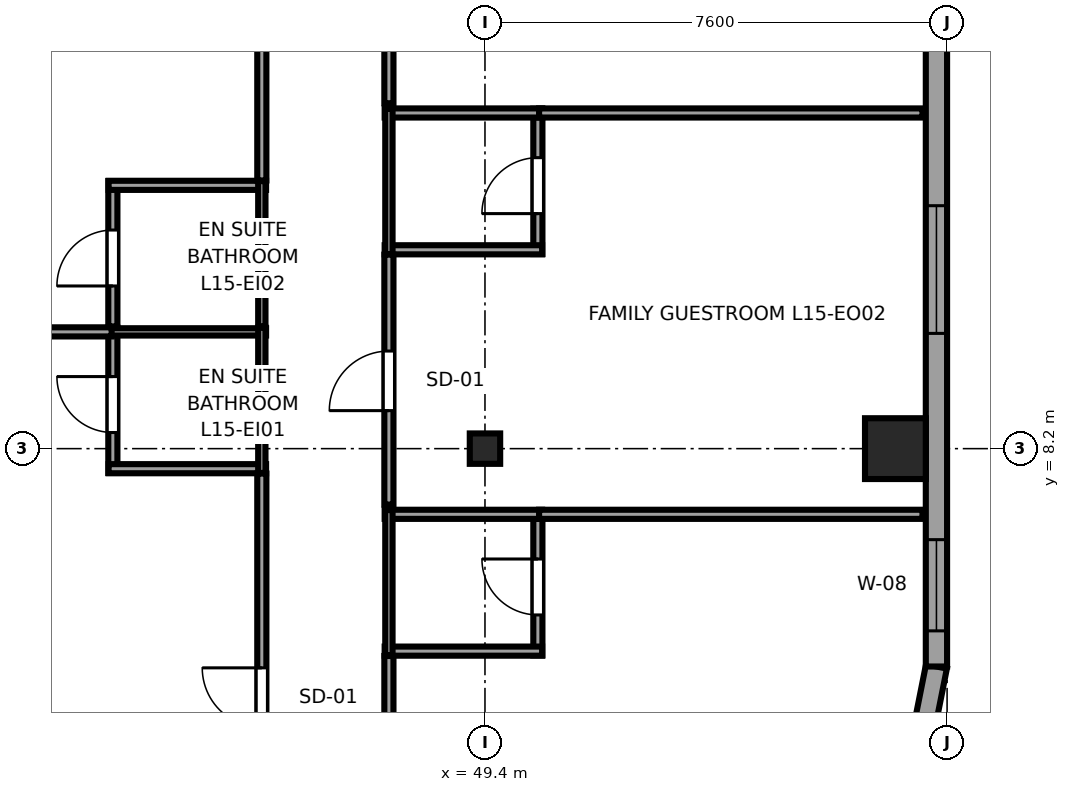
"""IFC4 building model, lengths in metres.
Left out: names, types, materials, properties, quantities, classifications, styles, units other than length and angle.
Written with IfcOpenShell. Run it as: python <this file> out.ifc"""

import sys

from ifc_helpers import new_model, si_unit, direction, frame, frame_2d, origin, origin_2d, place, context, subcontext, project, spatial, rectangle, i_section, extrude, source, transform, mapped, element, fill, save


model = new_model("IFC4")
c1 = context("Model", 3, precision=1e-05, world=origin(), true_north=direction((0.0, 1.0)))
c2 = subcontext(c1, "Body", "Model", "MODEL_VIEW")
j1 = project(units=[si_unit("LENGTHUNIT", "METRE"), si_unit("PLANEANGLEUNIT", "RADIAN")], contexts=[c1])
p1 = place(None, origin())
s1 = spatial("IfcSite", under=j1, at=p1, CompositionType="ELEMENT")
p2 = place(p1, origin())
s2 = spatial("IfcBuilding", under=s1, at=p2, CompositionType="ELEMENT")
p3 = place(p2, frame((0.0, 0.0, 63.95)))
s3 = spatial("IfcBuildingStorey", under=s2, at=p3, CompositionType="ELEMENT", Elevation=63.95)
m1 = source(origin(), c2, "Body", "SweptSolid", [
    extrude(i_section(OverallWidth=0.5, OverallDepth=0.5, WebThickness=0.028, FlangeThickness=0.045, at=origin_2d()), origin(), (0.0, 0.0, 1.0), 3.55),
])
p4 = place(p3, frame((49.4, 8.2, 0.0), z_axis=(0.0, 0.0, 1.0), x_axis=(1.0, 0.0, 0.0)))
e1 = element("IfcColumn", 1, at=p4, inside=s3, PredefinedType="COLUMN", context=c2, shape_type="MappedRepresentation", body=[
    mapped(m1, transform((0.0, 0.0, 0.0), x_axis=(1.0, 0.0, 0.0), y_axis=(0.0, 1.0, 0.0), z_axis=(0.0, 0.0, 1.0), scale=1.0)),
])
m2 = source(origin(), c2, "Body", "SweptSolid", [
    extrude(rectangle(XDim=1.0, YDim=1.0, at=origin_2d()), origin(), (0.0, 0.0, 1.0), 3.55),
])
p5 = place(p3, frame((56.15, 8.2, 0.0), z_axis=(0.0, 0.0, 1.0), x_axis=(1.0, 0.0, 0.0)))
e2 = element("IfcColumn", 2, at=p5, inside=s3, PredefinedType="COLUMN", context=c2, shape_type="MappedRepresentation", body=[
    mapped(m2, transform((0.0, 0.0, 0.0), x_axis=(1.0, 0.0, 0.0), y_axis=(0.0, 1.0, 0.0), z_axis=(0.0, 0.0, 1.0), scale=1.0)),
])
p6 = place(p3, frame((56.485, 2.908, 0.0), z_axis=(0.0, 0.0, 1.0), x_axis=(0.195011420161, 0.980800971659, 0.0)))
e3 = element("IfcWall", 3, at=p6, inside=s3, PredefinedType="SOLIDWALL", context=c2, shape_type="SweptSolid", body=[
    extrude(rectangle(XDim=1.743, YDim=0.35, at=frame_2d((0.871, 0.0))), origin(), (0.0, 0.0, 1.0), 3.37),
])
p7 = place(p3, frame((56.825, 4.617, 0.0), z_axis=(0.0, 0.0, 1.0), x_axis=(0.0, 1.0, 0.0)))
e4 = element("IfcWall", 4, at=p7, inside=s3, PredefinedType="SOLIDWALL", context=c2, shape_type="SweptSolid", body=[
    extrude(rectangle(XDim=36.766, YDim=0.35, at=frame_2d((18.383, 0.0))), origin(), (0.0, 0.0, 1.0), 3.37),
])
p8 = place(p7, frame((5.478, 0.0, 0.68)))
e5 = element("IfcOpeningElement", 5, at=p8, cuts=e4, PredefinedType="OPENING", context=c2, shape_type="SweptSolid", body=[
    extrude(rectangle(XDim=2.1, YDim=1.9, at=frame_2d((1.05, 0.95))), frame((0.0, 0.185, 0.0), z_axis=(0.0, -1.0, 0.0), x_axis=(1.0, 0.0, 0.0)), (0.0, 0.0, 1.0), 0.37),
])
p9 = place(p7, frame((12.831, 0.0, 0.68)))
e6 = element("IfcOpeningElement", 6, at=p9, cuts=e4, PredefinedType="OPENING", context=c2, shape_type="SweptSolid", body=[
    extrude(rectangle(XDim=2.1, YDim=1.9, at=frame_2d((1.05, 0.95))), frame((0.0, 0.185, 0.0), z_axis=(0.0, -1.0, 0.0), x_axis=(1.0, 0.0, 0.0)), (0.0, 0.0, 1.0), 0.37),
])
p10 = place(p7, frame((16.783, 0.0, 0.68)))
e7 = element("IfcOpeningElement", 7, at=p10, cuts=e4, PredefinedType="OPENING", context=c2, shape_type="SweptSolid", body=[
    extrude(rectangle(XDim=2.1, YDim=1.9, at=frame_2d((1.05, 0.95))), frame((0.0, 0.185, 0.0), z_axis=(0.0, -1.0, 0.0), x_axis=(1.0, 0.0, 0.0)), (0.0, 0.0, 1.0), 0.37),
])
p11 = place(p7, frame((25.236, 0.0, 0.68)))
e8 = element("IfcOpeningElement", 8, at=p11, cuts=e4, PredefinedType="OPENING", context=c2, shape_type="SweptSolid", body=[
    extrude(rectangle(XDim=2.1, YDim=1.9, at=frame_2d((1.05, 0.95))), frame((0.0, 0.185, 0.0), z_axis=(0.0, -1.0, 0.0), x_axis=(1.0, 0.0, 0.0)), (0.0, 0.0, 1.0), 0.37),
])
p12 = place(p7, frame((30.238, 0.0, 0.68)))
e9 = element("IfcOpeningElement", 9, at=p12, cuts=e4, PredefinedType="OPENING", context=c2, shape_type="SweptSolid", body=[
    extrude(rectangle(XDim=2.1, YDim=1.9, at=frame_2d((1.05, 0.95))), frame((0.0, 0.185, 0.0), z_axis=(0.0, -1.0, 0.0), x_axis=(1.0, 0.0, 0.0)), (0.0, 0.0, 1.0), 0.37),
])
p13 = place(p7, frame((33.14, 0.0, 0.68)))
e10 = element("IfcOpeningElement", 10, at=p13, cuts=e4, PredefinedType="OPENING", context=c2, shape_type="SweptSolid", body=[
    extrude(rectangle(XDim=2.1, YDim=1.9, at=frame_2d((1.05, 0.95))), frame((0.0, 0.185, 0.0), z_axis=(0.0, -1.0, 0.0), x_axis=(1.0, 0.0, 0.0)), (0.0, 0.0, 1.0), 0.37),
])
p14 = place(p7, frame((0.586, 0.0, 0.62)))
e11 = element("IfcOpeningElement", 11, at=p14, cuts=e4, PredefinedType="OPENING", context=c2, shape_type="SweptSolid", body=[
    extrude(rectangle(XDim=1.5, YDim=1.55, at=frame_2d((0.75, 0.775))), frame((0.0, 0.185, 0.0), z_axis=(0.0, -1.0, 0.0), x_axis=(1.0, 0.0, 0.0)), (0.0, 0.0, 1.0), 0.37),
])
p15 = place(p3, frame((43.28, 7.8, 0.0), z_axis=(0.0, 0.0, 1.0), x_axis=(0.0, 1.0, 0.0)))
e12 = element("IfcWall", 12, at=p15, inside=s3, PredefinedType="PARTITIONING", context=c2, shape_type="SweptSolid", body=[
    extrude(rectangle(XDim=2.39, YDim=0.15, at=frame_2d((1.195, 0.0))), origin(), (0.0, 0.0, 1.0), 3.37),
])
p16 = place(p15, frame((0.665, 0.0, 0.0)))
e13 = element("IfcOpeningElement", 13, at=p16, cuts=e12, PredefinedType="OPENING", context=c2, shape_type="SweptSolid", body=[
    extrude(rectangle(XDim=0.92, YDim=2.01, at=frame_2d((0.46, 1.005))), frame((0.0, 0.085, 0.0), z_axis=(0.0, -1.0, 0.0), x_axis=(1.0, 0.0, 0.0)), (0.0, 0.0, 1.0), 0.17),
])
p17 = place(p3, frame((43.21, 7.87, 0.0), z_axis=(0.0, 0.0, 1.0), x_axis=(1.0, 0.0, 0.0)))
e14 = element("IfcWall", 14, at=p17, inside=s3, PredefinedType="PARTITIONING", context=c2, shape_type="SweptSolid", body=[
    extrude(rectangle(XDim=2.59, YDim=0.15, at=frame_2d((1.295, 0.0))), origin(), (0.0, 0.0, 1.0), 3.37),
])
p18 = place(p3, frame((43.21, 10.12, 0.0), z_axis=(0.0, 0.0, 1.0), x_axis=(1.0, 0.0, 0.0)))
e15 = element("IfcWall", 15, at=p18, inside=s3, PredefinedType="PLUMBINGWALL", context=c2, shape_type="SweptSolid", body=[
    extrude(rectangle(XDim=2.59, YDim=0.12, at=frame_2d((1.295, 0.0))), origin(), (0.0, 0.0, 1.0), 3.37),
])
p19 = place(p3, frame((45.73, 7.8, 0.0), z_axis=(0.0, 0.0, 1.0), x_axis=(0.0, 1.0, 0.0)))
e16 = element("IfcWall", 16, at=p19, inside=s3, PredefinedType="PLUMBINGWALL", context=c2, shape_type="SweptSolid", body=[
    extrude(rectangle(XDim=2.39, YDim=0.12, at=frame_2d((1.195, 0.0))), origin(), (0.0, 0.0, 1.0), 2.954),
])
p20 = place(p3, frame((43.28, 10.21, 0.0), z_axis=(0.0, 0.0, 1.0), x_axis=(0.0, 1.0, 0.0)))
e17 = element("IfcWall", 17, at=p20, inside=s3, PredefinedType="PARTITIONING", context=c2, shape_type="SweptSolid", body=[
    extrude(rectangle(XDim=2.39, YDim=0.15, at=frame_2d((1.195, 0.0))), origin(), (0.0, 0.0, 1.0), 3.37),
])
p21 = place(p20, frame((0.665, 0.0, 0.0)))
e18 = element("IfcOpeningElement", 18, at=p21, cuts=e17, PredefinedType="OPENING", context=c2, shape_type="SweptSolid", body=[
    extrude(rectangle(XDim=0.92, YDim=2.01, at=frame_2d((0.46, 1.005))), frame((0.0, 0.085, 0.0), z_axis=(0.0, -1.0, 0.0), x_axis=(1.0, 0.0, 0.0)), (0.0, 0.0, 1.0), 0.17),
])
p22 = place(p3, frame((43.21, 12.53, 0.0), z_axis=(0.0, 0.0, 1.0), x_axis=(1.0, 0.0, 0.0)))
e19 = element("IfcWall", 19, at=p22, inside=s3, PredefinedType="PARTITIONING", context=c2, shape_type="SweptSolid", body=[
    extrude(rectangle(XDim=2.59, YDim=0.15, at=frame_2d((1.295, 0.0))), origin(), (0.0, 0.0, 1.0), 3.37),
])
p23 = place(p3, frame((45.73, 10.21, 0.0), z_axis=(0.0, 0.0, 1.0), x_axis=(0.0, 1.0, 0.0)))
e20 = element("IfcWall", 20, at=p23, inside=s3, PredefinedType="PLUMBINGWALL", context=c2, shape_type="SweptSolid", body=[
    extrude(rectangle(XDim=2.39, YDim=0.12, at=frame_2d((1.195, 0.0))), origin(), (0.0, 0.0, 1.0), 2.954),
])
p24 = place(p3, frame((50.27, 4.8, 0.0), z_axis=(0.0, 0.0, 1.0), x_axis=(0.0, 1.0, 0.0)))
e21 = element("IfcWall", 21, at=p24, inside=s3, PredefinedType="PARTITIONING", context=c2, shape_type="SweptSolid", body=[
    extrude(rectangle(XDim=2.39, YDim=0.15, at=frame_2d((1.195, 0.0))), origin(), (0.0, 0.0, 1.0), 3.37),
])
p25 = place(p24, frame((0.665, 0.0, 0.0)))
e22 = element("IfcOpeningElement", 22, at=p25, cuts=e21, PredefinedType="OPENING", context=c2, shape_type="SweptSolid", body=[
    extrude(rectangle(XDim=0.92, YDim=2.01, at=frame_2d((0.46, 1.005))), frame((0.0, 0.085, 0.0), z_axis=(0.0, -1.0, 0.0), x_axis=(1.0, 0.0, 0.0)), (0.0, 0.0, 1.0), 0.17),
])
for number, where, z_axis, x_axis in (
    (23, (47.75, 4.87, 0.0), (0.0, 0.0, 1.0), (1.0, 0.0, 0.0)),
    (24, (47.75, 7.12, 0.0), (0.0, 0.0, 1.0), (1.0, 0.0, 0.0)),
):
    element("IfcWall", number, at=place(p3, frame(where, z_axis=z_axis, x_axis=x_axis)), inside=s3, PredefinedType="PARTITIONING", context=c2, shape_type="SweptSolid", body=[
        extrude(rectangle(XDim=2.59, YDim=0.15, at=frame_2d((1.295, 0.0))), origin(), (0.0, 0.0, 1.0), 3.37),
    ])
p26 = place(p3, frame((47.82, 4.8, 0.0), z_axis=(0.0, 0.0, 1.0), x_axis=(0.0, 1.0, 0.0)))
e25 = element("IfcWall", 25, at=p26, inside=s3, PredefinedType="PLUMBINGWALL", context=c2, shape_type="SweptSolid", body=[
    extrude(rectangle(XDim=2.39, YDim=0.12, at=frame_2d((1.195, 0.0))), origin(), (0.0, 0.0, 1.0), 3.37),
])
p27 = place(p3, frame((50.27, 11.4, 0.0), z_axis=(0.0, 0.0, 1.0), x_axis=(0.0, 1.0, 0.0)))
e26 = element("IfcWall", 26, at=p27, inside=s3, PredefinedType="PARTITIONING", context=c2, shape_type="SweptSolid", body=[
    extrude(rectangle(XDim=2.39, YDim=0.15, at=frame_2d((1.195, 0.0))), origin(), (0.0, 0.0, 1.0), 3.37),
])
p28 = place(p27, frame((0.665, 0.0, 0.0)))
e27 = element("IfcOpeningElement", 27, at=p28, cuts=e26, PredefinedType="OPENING", context=c2, shape_type="SweptSolid", body=[
    extrude(rectangle(XDim=0.92, YDim=2.01, at=frame_2d((0.46, 1.005))), frame((0.0, 0.085, 0.0), z_axis=(0.0, -1.0, 0.0), x_axis=(1.0, 0.0, 0.0)), (0.0, 0.0, 1.0), 0.17),
])
for number, where, z_axis, x_axis in (
    (28, (47.75, 11.47, 0.0), (0.0, 0.0, 1.0), (1.0, 0.0, 0.0)),
    (29, (47.75, 13.72, 0.0), (0.0, 0.0, 1.0), (1.0, 0.0, 0.0)),
):
    element("IfcWall", number, at=place(p3, frame(where, z_axis=z_axis, x_axis=x_axis)), inside=s3, PredefinedType="PARTITIONING", context=c2, shape_type="SweptSolid", body=[
        extrude(rectangle(XDim=2.59, YDim=0.15, at=frame_2d((1.295, 0.0))), origin(), (0.0, 0.0, 1.0), 3.37),
    ])
p29 = place(p3, frame((47.82, 11.4, 0.0), z_axis=(0.0, 0.0, 1.0), x_axis=(0.0, 1.0, 0.0)))
e30 = element("IfcWall", 30, at=p29, inside=s3, PredefinedType="PLUMBINGWALL", context=c2, shape_type="SweptSolid", body=[
    extrude(rectangle(XDim=2.39, YDim=0.12, at=frame_2d((1.195, 0.0))), origin(), (0.0, 0.0, 1.0), 3.37),
])
p30 = place(p3, frame((45.73, 0.405, 0.0), z_axis=(0.0, 0.0, 1.0), x_axis=(0.0, 1.0, 0.0)))
e31 = element("IfcWall", 31, at=p30, inside=s3, PredefinedType="PARTITIONING", context=c2, shape_type="SweptSolid", body=[
    extrude(rectangle(XDim=7.385, YDim=0.15, at=frame_2d((3.692, 0.0))), origin(), (0.0, 0.0, 1.0), 3.37),
])
p31 = place(p30, frame((3.21, 0.0, 0.0)))
e32 = element("IfcOpeningElement", 32, at=p31, cuts=e31, PredefinedType="OPENING", context=c2, shape_type="SweptSolid", body=[
    extrude(rectangle(XDim=0.98, YDim=2.12, at=frame_2d((0.49, 1.06))), frame((0.0, 0.085, 0.0), z_axis=(0.0, -1.0, 0.0), x_axis=(1.0, 0.0, 0.0)), (0.0, 0.0, 1.0), 0.17),
])
p32 = place(p3, frame((34.65, 10.12, 0.0), z_axis=(0.0, 0.0, 1.0), x_axis=(1.0, 0.0, 0.0)))
e33 = element("IfcWall", 33, at=p32, inside=s3, PredefinedType="PARTITIONING", context=c2, shape_type="SweptSolid", body=[
    extrude(rectangle(XDim=8.61, YDim=0.15, at=frame_2d((4.305, 0.0))), origin(), (0.0, 0.0, 1.0), 3.37),
])
p33 = place(p3, frame((45.73, 12.61, 0.0), z_axis=(0.0, 0.0, 1.0), x_axis=(0.0, 1.0, 0.0)))
e34 = element("IfcWall", 34, at=p33, inside=s3, PredefinedType="PARTITIONING", context=c2, shape_type="SweptSolid", body=[
    extrude(rectangle(XDim=7.61, YDim=0.15, at=frame_2d((3.805, 0.0))), origin(), (0.0, 0.0, 1.0), 2.954),
])
p34 = place(p33, frame((3.295, 0.0, 0.0)))
e35 = element("IfcOpeningElement", 35, at=p34, cuts=e34, PredefinedType="OPENING", context=c2, shape_type="SweptSolid", body=[
    extrude(rectangle(XDim=0.98, YDim=2.12, at=frame_2d((0.49, 1.06))), frame((0.0, 0.085, 0.0), z_axis=(0.0, -1.0, 0.0), x_axis=(1.0, 0.0, 0.0)), (0.0, 0.0, 1.0), 0.17),
])
p35 = place(p3, frame((47.82, 0.405, 0.0), z_axis=(0.0, 0.0, 1.0), x_axis=(0.0, 1.0, 0.0)))
e36 = element("IfcWall", 36, at=p35, inside=s3, PredefinedType="PARTITIONING", context=c2, shape_type="SweptSolid", body=[
    extrude(rectangle(XDim=4.385, YDim=0.15, at=frame_2d((2.192, 0.0))), origin(), (0.0, 0.0, 1.0), 3.37),
])
p36 = place(p35, frame((1.71, 0.0, 0.0)))
e37 = element("IfcOpeningElement", 37, at=p36, cuts=e36, PredefinedType="OPENING", context=c2, shape_type="SweptSolid", body=[
    extrude(rectangle(XDim=0.98, YDim=2.12, at=frame_2d((0.49, 1.06))), frame((0.0, 0.085, 0.0), z_axis=(0.0, -1.0, 0.0), x_axis=(1.0, 0.0, 0.0)), (0.0, 0.0, 1.0), 0.17),
])
p37 = place(p3, frame((50.29, 7.12, 0.0), z_axis=(0.0, 0.0, 1.0), x_axis=(1.0, 0.0, 0.0)))
e38 = element("IfcWall", 38, at=p37, inside=s3, PredefinedType="PARTITIONING", context=c2, shape_type="SweptSolid", body=[
    extrude(rectangle(XDim=6.305, YDim=0.15, at=frame_2d((3.152, 0.0))), origin(), (0.0, 0.0, 1.0), 3.37),
])
p38 = place(p3, frame((47.82, 7.28, 0.0), z_axis=(0.0, 0.0, 1.0), x_axis=(0.0, 1.0, 0.0)))
e39 = element("IfcWall", 39, at=p38, inside=s3, PredefinedType="PARTITIONING", context=c2, shape_type="SweptSolid", body=[
    extrude(rectangle(XDim=4.11, YDim=0.15, at=frame_2d((2.055, 0.0))), origin(), (0.0, 0.0, 1.0), 3.37),
])
p39 = place(p38, frame((1.545, 0.0, 0.0)))
e40 = element("IfcOpeningElement", 40, at=p39, cuts=e39, PredefinedType="OPENING", context=c2, shape_type="SweptSolid", body=[
    extrude(rectangle(XDim=0.98, YDim=2.12, at=frame_2d((0.49, 1.06))), frame((0.0, 0.085, 0.0), z_axis=(0.0, -1.0, 0.0), x_axis=(1.0, 0.0, 0.0)), (0.0, 0.0, 1.0), 0.17),
])
p40 = place(p3, frame((50.29, 13.72, 0.0), z_axis=(0.0, 0.0, 1.0), x_axis=(1.0, 0.0, 0.0)))
e41 = element("IfcWall", 41, at=p40, inside=s3, PredefinedType="PARTITIONING", context=c2, shape_type="SweptSolid", body=[
    extrude(rectangle(XDim=6.305, YDim=0.15, at=frame_2d((3.152, 0.0))), origin(), (0.0, 0.0, 1.0), 3.37),
])
p41 = place(p3, frame((47.82, 13.88, 0.0), z_axis=(0.0, 0.0, 1.0), x_axis=(0.0, 1.0, 0.0)))
e42 = element("IfcWall", 42, at=p41, inside=s3, PredefinedType="PARTITIONING", context=c2, shape_type="SweptSolid", body=[
    extrude(rectangle(XDim=4.01, YDim=0.15, at=frame_2d((2.005, 0.0))), origin(), (0.0, 0.0, 1.0), 3.37),
])
p42 = place(p41, frame((1.495, 0.0, 0.0)))
e43 = element("IfcOpeningElement", 43, at=p42, cuts=e42, PredefinedType="OPENING", context=c2, shape_type="SweptSolid", body=[
    extrude(rectangle(XDim=0.98, YDim=2.12, at=frame_2d((0.49, 1.06))), frame((0.0, 0.085, 0.0), z_axis=(0.0, -1.0, 0.0), x_axis=(1.0, 0.0, 0.0)), (0.0, 0.0, 1.0), 0.17),
])
m3 = source(origin(), c2, "Body", "SweptSolid", [
    extrude(rectangle(XDim=2.1, YDim=1.9, at=frame_2d((1.05, 0.95))), frame((0.0, 0.09, 0.0), z_axis=(0.0, -1.0, 0.0), x_axis=(1.0, 0.0, 0.0)), (0.0, 0.0, 1.0), 0.06),
])
p43 = place(p8, origin())
e44 = element("IfcWindow", 44, at=p43, inside=s3, PartitioningType="TRIPLE_PANEL_HORIZONTAL", PredefinedType="WINDOW", context=c2, shape_type="MappedRepresentation", body=[
    mapped(m3, transform((0.0, 0.0, 0.0), x_axis=(1.0, 0.0, 0.0), y_axis=(0.0, 1.0, 0.0), z_axis=(0.0, 0.0, 1.0), scale=1.0)),
])
fill(e5, e44)
m4 = source(origin(), c2, "Body", "SweptSolid", [
    extrude(rectangle(XDim=1.5, YDim=1.55, at=frame_2d((0.75, 0.775))), frame((0.0, 0.09, 0.0), z_axis=(0.0, -1.0, 0.0), x_axis=(1.0, 0.0, 0.0)), (0.0, 0.0, 1.0), 0.06),
])
p44 = place(p14, origin())
e45 = element("IfcWindow", 45, at=p44, inside=s3, PartitioningType="SINGLE_PANEL", PredefinedType="WINDOW", context=c2, shape_type="MappedRepresentation", body=[
    mapped(m4, transform((0.0, 0.0, 0.0), x_axis=(1.0, 0.0, 0.0), y_axis=(0.0, 1.0, 0.0), z_axis=(0.0, 0.0, 1.0), scale=1.0)),
])
fill(e11, e45)
m5 = source(origin(), c2, "Body", "SweptSolid", [
    extrude(rectangle(XDim=0.92, YDim=2.01, at=frame_2d((0.46, 1.005))), frame((0.0, 0.025, 0.0), z_axis=(0.0, -1.0, 0.0), x_axis=(1.0, 0.0, 0.0)), (0.0, 0.0, 1.0), 0.05),
])
p45 = place(p16, origin())
e46 = element("IfcDoor", 46, at=p45, inside=s3, OperationType="SINGLE_SWING_RIGHT", PredefinedType="DOOR", context=c2, shape_type="MappedRepresentation", body=[
    mapped(m5, transform((0.0, 0.0, 0.0), x_axis=(1.0, 0.0, 0.0), y_axis=(0.0, 1.0, 0.0), z_axis=(0.0, 0.0, 1.0), scale=1.0)),
])
fill(e13, e46)
p46 = place(p21, origin())
e47 = element("IfcDoor", 47, at=p46, inside=s3, OperationType="SINGLE_SWING_LEFT", PredefinedType="DOOR", context=c2, shape_type="MappedRepresentation", body=[
    mapped(m5, transform((0.0, 0.0, 0.0), x_axis=(1.0, 0.0, 0.0), y_axis=(0.0, 1.0, 0.0), z_axis=(0.0, 0.0, 1.0), scale=1.0)),
])
fill(e18, e47)
p47 = place(p25, origin())
e48 = element("IfcDoor", 48, at=p47, inside=s3, OperationType="SINGLE_SWING_RIGHT", PredefinedType="DOOR", context=c2, shape_type="MappedRepresentation", body=[
    mapped(m5, transform((0.0, 0.0, 0.0), x_axis=(1.0, 0.0, 0.0), y_axis=(0.0, 1.0, 0.0), z_axis=(0.0, 0.0, 1.0), scale=1.0)),
])
fill(e22, e48)
p48 = place(p28, origin())
e49 = element("IfcDoor", 49, at=p48, inside=s3, OperationType="SINGLE_SWING_LEFT", PredefinedType="DOOR", context=c2, shape_type="MappedRepresentation", body=[
    mapped(m5, transform((0.0, 0.0, 0.0), x_axis=(1.0, 0.0, 0.0), y_axis=(0.0, 1.0, 0.0), z_axis=(0.0, 0.0, 1.0), scale=1.0)),
])
fill(e27, e49)
m6 = source(origin(), c2, "Body", "SweptSolid", [
    extrude(rectangle(XDim=0.98, YDim=2.12, at=frame_2d((0.49, 1.06))), frame((0.0, 0.025, 0.0), z_axis=(0.0, -1.0, 0.0), x_axis=(1.0, 0.0, 0.0)), (0.0, 0.0, 1.0), 0.05),
])
p49 = place(p31, origin())
e50 = element("IfcDoor", 50, at=p49, inside=s3, OperationType="SINGLE_SWING_RIGHT", PredefinedType="DOOR", context=c2, shape_type="MappedRepresentation", body=[
    mapped(m6, transform((0.0, 0.0, 0.0), x_axis=(1.0, 0.0, 0.0), y_axis=(0.0, 1.0, 0.0), z_axis=(0.0, 0.0, 1.0), scale=1.0)),
])
fill(e32, e50)
p50 = place(p39, origin())
e51 = element("IfcDoor", 51, at=p50, inside=s3, OperationType="SINGLE_SWING_LEFT", PredefinedType="DOOR", context=c2, shape_type="MappedRepresentation", body=[
    mapped(m6, transform((0.0, 0.0, 0.0), x_axis=(1.0, 0.0, 0.0), y_axis=(0.0, 1.0, 0.0), z_axis=(0.0, 0.0, 1.0), scale=1.0)),
])
fill(e40, e51)
save(model, sys.argv[1])
